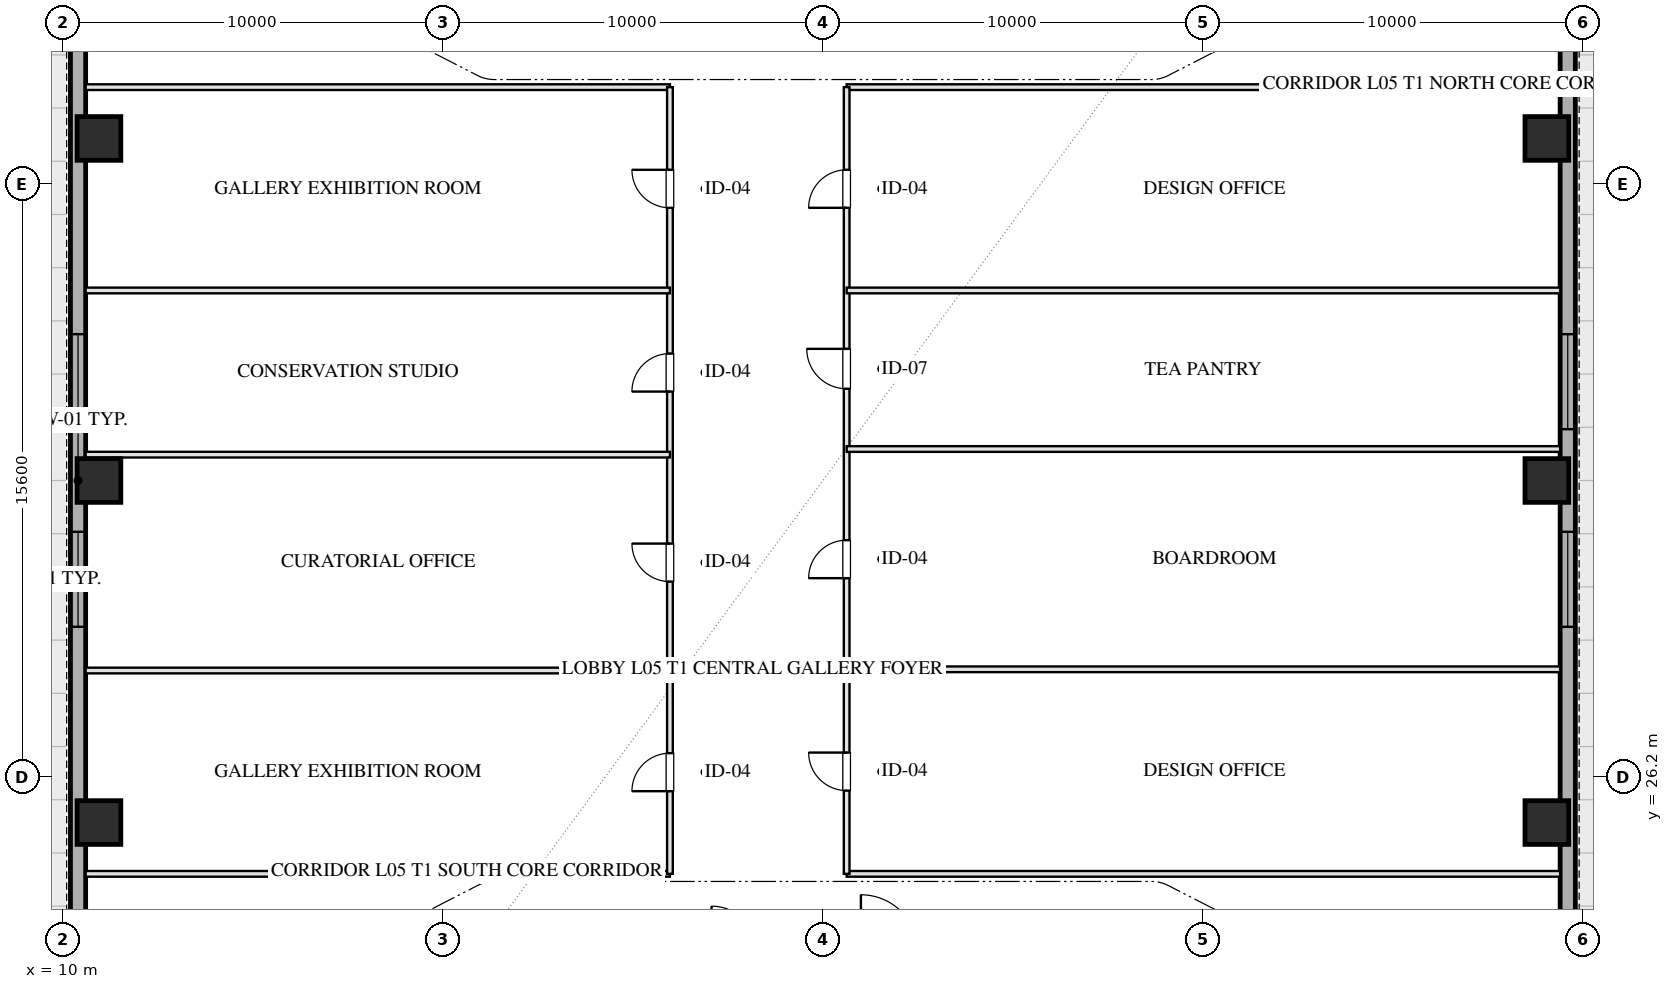
"""IFC4 building model, lengths in metres.
Left out: names, types, materials, properties, quantities, classifications, styles, units other than length and angle.
Written with IfcOpenShell. Run it as: python <this file> out.ifc"""

import sys

from ifc_helpers import new_model, si_unit, direction, frame, frame_2d, origin, origin_2d, place, context, subcontext, project, spatial, rectangle, hollow_rectangle, extrude, element, fill, save


model = new_model("IFC4")
c1 = context("Model", 3, precision=1e-05, world=origin(), true_north=direction((0.0, 1.0)))
c2 = subcontext(c1, "Body", "Model", "MODEL_VIEW")
j1 = project(units=[si_unit("LENGTHUNIT", "METRE"), si_unit("PLANEANGLEUNIT", "RADIAN")], contexts=[c1])
p1 = place(None, origin())
s1 = spatial("IfcSite", under=j1, at=p1, CompositionType="ELEMENT")
p2 = place(p1, origin())
s2 = spatial("IfcBuilding", under=s1, at=p2, CompositionType="ELEMENT")
p3 = place(p2, frame((0.0, 0.0, 26.0)))
s3 = spatial("IfcBuildingStorey", under=s2, at=p3, CompositionType="ELEMENT", Elevation=26.0)
for number, where, z_axis, x_axis in (
    (1, (10.95, 25.0, 0.0), (0.0, 0.0, 1.0), (1.0, 0.0, 0.0)),
    (2, (10.95, 34.0, 0.0), (0.0, 0.0, 1.0), (1.0, 0.0, 0.0)),
    (3, (10.95, 43.0, 0.0), (0.0, 0.0, 1.0), (1.0, 0.0, 0.0)),
    (4, (49.05, 25.0, 0.0), (0.0, 0.0, 1.0), (1.0, 0.0, 0.0)),
    (5, (49.05, 34.0, 0.0), (0.0, 0.0, 1.0), (1.0, 0.0, 0.0)),
    (6, (49.05, 43.0, 0.0), (0.0, 0.0, 1.0), (1.0, 0.0, 0.0)),
):
    element("IfcColumn", number, at=place(p3, frame(where, z_axis=z_axis, x_axis=x_axis)), inside=s3, PredefinedType="COLUMN", context=c2, shape_type="SweptSolid", body=[
        extrude(hollow_rectangle(XDim=1.15, YDim=1.15, WallThickness=0.04, at=origin_2d()), origin(), (0.0, 0.0, 1.0), 4.001),
    ])
p4 = place(p3, frame((10.4, 7.2, 0.0), z_axis=(0.0, 0.0, 1.0), x_axis=(0.0, 1.0, 0.0)))
e7 = element("IfcWall", 7, at=p4, inside=s3, PredefinedType="SOLIDWALL", context=c2, shape_type="SweptSolid", body=[
    extrude(rectangle(XDim=53.6, YDim=0.4, at=frame_2d((26.8, 0.0))), origin(), (0.0, 0.0, 1.0), 3.16),
])
p5 = place(p4, frame((22.95, 0.0, 0.75)))
e8 = element("IfcOpeningElement", 8, at=p5, cuts=e7, PredefinedType="OPENING", context=c2, shape_type="SweptSolid", body=[
    extrude(rectangle(XDim=2.5, YDim=1.75, at=frame_2d((1.25, 0.875))), frame((0.0, 0.21, 0.0), z_axis=(0.0, -1.0, 0.0), x_axis=(1.0, 0.0, 0.0)), (0.0, 0.0, 1.0), 0.42),
])
p6 = place(p4, frame((28.15, 0.0, 0.75)))
e9 = element("IfcOpeningElement", 9, at=p6, cuts=e7, PredefinedType="OPENING", context=c2, shape_type="SweptSolid", body=[
    extrude(rectangle(XDim=2.5, YDim=1.75, at=frame_2d((1.25, 0.875))), frame((0.0, 0.21, 0.0), z_axis=(0.0, -1.0, 0.0), x_axis=(1.0, 0.0, 0.0)), (0.0, 0.0, 1.0), 0.42),
])
p7 = place(p3, frame((49.6, 60.8, 0.0), z_axis=(0.0, 0.0, 1.0), x_axis=(0.0, -1.0, 0.0)))
e10 = element("IfcWall", 10, at=p7, inside=s3, PredefinedType="SOLIDWALL", context=c2, shape_type="SweptSolid", body=[
    extrude(rectangle(XDim=53.6, YDim=0.4, at=frame_2d((26.8, 0.0))), origin(), (0.0, 0.0, 1.0), 3.16),
])
p8 = place(p7, frame((28.15, 0.0, 0.75)))
e11 = element("IfcOpeningElement", 11, at=p8, cuts=e10, PredefinedType="OPENING", context=c2, shape_type="SweptSolid", body=[
    extrude(rectangle(XDim=2.5, YDim=1.75, at=frame_2d((1.25, 0.875))), frame((0.0, 0.21, 0.0), z_axis=(0.0, -1.0, 0.0), x_axis=(1.0, 0.0, 0.0)), (0.0, 0.0, 1.0), 0.42),
])
p9 = place(p7, frame((22.95, 0.0, 0.75)))
e12 = element("IfcOpeningElement", 12, at=p9, cuts=e10, PredefinedType="OPENING", context=c2, shape_type="SweptSolid", body=[
    extrude(rectangle(XDim=2.5, YDim=1.75, at=frame_2d((1.25, 0.875))), frame((0.0, 0.21, 0.0), z_axis=(0.0, -1.0, 0.0), x_axis=(1.0, 0.0, 0.0)), (0.0, 0.0, 1.0), 0.42),
])
p10 = place(p3, frame((10.6, 23.65, 0.0), z_axis=(0.0, 0.0, 1.0), x_axis=(1.0, 0.0, 0.0)))
e13 = element("IfcWall", 13, at=p10, inside=s3, PredefinedType="PARTITIONING", context=c2, shape_type="SweptSolid", body=[
    extrude(rectangle(XDim=15.375, YDim=0.15, at=frame_2d((7.688, 0.0))), origin(), (0.0, 0.0, 1.0), 3.725),
])
p11 = place(p3, frame((30.625, 23.65, 0.0), z_axis=(0.0, 0.0, 1.0), x_axis=(1.0, 0.0, 0.0)))
e14 = element("IfcWall", 14, at=p11, inside=s3, PredefinedType="PARTITIONING", context=c2, shape_type="SweptSolid", body=[
    extrude(rectangle(XDim=18.775, YDim=0.15, at=frame_2d((9.387, 0.0))), origin(), (0.0, 0.0, 1.0), 3.725),
])
p12 = place(p3, frame((10.6, 44.35, 0.0), z_axis=(0.0, 0.0, 1.0), x_axis=(1.0, 0.0, 0.0)))
e15 = element("IfcWall", 15, at=p12, inside=s3, PredefinedType="PARTITIONING", context=c2, shape_type="SweptSolid", body=[
    extrude(rectangle(XDim=15.375, YDim=0.15, at=frame_2d((7.688, 0.0))), origin(), (0.0, 0.0, 1.0), 3.725),
])
p13 = place(p3, frame((30.625, 44.35, 0.0), z_axis=(0.0, 0.0, 1.0), x_axis=(1.0, 0.0, 0.0)))
e16 = element("IfcWall", 16, at=p13, inside=s3, PredefinedType="PARTITIONING", context=c2, shape_type="SweptSolid", body=[
    extrude(rectangle(XDim=18.775, YDim=0.15, at=frame_2d((9.387, 0.0))), origin(), (0.0, 0.0, 1.0), 3.725),
])
p14 = place(p3, frame((25.975, 23.65, 0.0), z_axis=(0.0, 0.0, 1.0), x_axis=(0.0, 1.0, 0.0)))
e17 = element("IfcWall", 17, at=p14, inside=s3, PredefinedType="PARTITIONING", context=c2, shape_type="SweptSolid", body=[
    extrude(rectangle(XDim=20.7, YDim=0.15, at=frame_2d((10.35, 0.0))), origin(), (0.0, 0.0, 1.0), 3.725),
])
p15 = place(p14, frame((2.175, 0.0, 0.0)))
e18 = element("IfcOpeningElement", 18, at=p15, cuts=e17, PredefinedType="OPENING", context=c2, shape_type="SweptSolid", body=[
    extrude(rectangle(XDim=1.0, YDim=2.05, at=frame_2d((0.5, 1.025))), frame((0.0, 0.085, 0.0), z_axis=(0.0, -1.0, 0.0), x_axis=(1.0, 0.0, 0.0)), (0.0, 0.0, 1.0), 0.17),
])
p16 = place(p14, frame((7.69, 0.0, 0.0)))
e19 = element("IfcOpeningElement", 19, at=p16, cuts=e17, PredefinedType="OPENING", context=c2, shape_type="SweptSolid", body=[
    extrude(rectangle(XDim=1.0, YDim=2.05, at=frame_2d((0.5, 1.025))), frame((0.0, 0.085, 0.0), z_axis=(0.0, -1.0, 0.0), x_axis=(1.0, 0.0, 0.0)), (0.0, 0.0, 1.0), 0.17),
])
p17 = place(p14, frame((12.69, 0.0, 0.0)))
e20 = element("IfcOpeningElement", 20, at=p17, cuts=e17, PredefinedType="OPENING", context=c2, shape_type="SweptSolid", body=[
    extrude(rectangle(XDim=1.0, YDim=2.05, at=frame_2d((0.5, 1.025))), frame((0.0, 0.085, 0.0), z_axis=(0.0, -1.0, 0.0), x_axis=(1.0, 0.0, 0.0)), (0.0, 0.0, 1.0), 0.17),
])
p18 = place(p14, frame((17.525, 0.0, 0.0)))
e21 = element("IfcOpeningElement", 21, at=p18, cuts=e17, PredefinedType="OPENING", context=c2, shape_type="SweptSolid", body=[
    extrude(rectangle(XDim=1.0, YDim=2.05, at=frame_2d((0.5, 1.025))), frame((0.0, 0.085, 0.0), z_axis=(0.0, -1.0, 0.0), x_axis=(1.0, 0.0, 0.0)), (0.0, 0.0, 1.0), 0.17),
])
p19 = place(p3, frame((30.625, 23.65, 0.0), z_axis=(0.0, 0.0, 1.0), x_axis=(0.0, 1.0, 0.0)))
e22 = element("IfcWall", 22, at=p19, inside=s3, PredefinedType="PARTITIONING", context=c2, shape_type="SweptSolid", body=[
    extrude(rectangle(XDim=20.7, YDim=0.15, at=frame_2d((10.35, 0.0))), origin(), (0.0, 0.0, 1.0), 3.725),
])
p20 = place(p19, frame((2.191, 0.0, 0.0)))
e23 = element("IfcOpeningElement", 23, at=p20, cuts=e22, PredefinedType="OPENING", context=c2, shape_type="SweptSolid", body=[
    extrude(rectangle(XDim=1.0, YDim=2.05, at=frame_2d((0.5, 1.025))), frame((0.0, 0.085, 0.0), z_axis=(0.0, -1.0, 0.0), x_axis=(1.0, 0.0, 0.0)), (0.0, 0.0, 1.0), 0.17),
])
p21 = place(p19, frame((7.78, 0.0, 0.0)))
e24 = element("IfcOpeningElement", 24, at=p21, cuts=e22, PredefinedType="OPENING", context=c2, shape_type="SweptSolid", body=[
    extrude(rectangle(XDim=1.0, YDim=2.05, at=frame_2d((0.5, 1.025))), frame((0.0, 0.085, 0.0), z_axis=(0.0, -1.0, 0.0), x_axis=(1.0, 0.0, 0.0)), (0.0, 0.0, 1.0), 0.17),
])
p22 = place(p19, frame((12.764, 0.0, 0.0)))
e25 = element("IfcOpeningElement", 25, at=p22, cuts=e22, PredefinedType="OPENING", context=c2, shape_type="SweptSolid", body=[
    extrude(rectangle(XDim=1.05, YDim=2.05, at=frame_2d((0.525, 1.025))), frame((0.0, 0.085, 0.0), z_axis=(0.0, -1.0, 0.0), x_axis=(1.0, 0.0, 0.0)), (0.0, 0.0, 1.0), 0.17),
])
p23 = place(p19, frame((17.525, 0.0, 0.0)))
e26 = element("IfcOpeningElement", 26, at=p23, cuts=e22, PredefinedType="OPENING", context=c2, shape_type="SweptSolid", body=[
    extrude(rectangle(XDim=1.0, YDim=2.05, at=frame_2d((0.5, 1.025))), frame((0.0, 0.085, 0.0), z_axis=(0.0, -1.0, 0.0), x_axis=(1.0, 0.0, 0.0)), (0.0, 0.0, 1.0), 0.17),
])
for number, where, z_axis, x_axis in (
    (27, (10.6, 29.0, 0.0), (0.0, 0.0, 1.0), (1.0, 0.0, 0.0)),
    (28, (10.6, 34.68, 0.0), (0.0, 0.0, 1.0), (1.0, 0.0, 0.0)),
    (29, (10.6, 39.0, 0.0), (0.0, 0.0, 1.0), (1.0, 0.0, 0.0)),
):
    element("IfcWall", number, at=place(p3, frame(where, z_axis=z_axis, x_axis=x_axis)), inside=s3, PredefinedType="PARTITIONING", context=c2, shape_type="SweptSolid", body=[
        extrude(rectangle(XDim=15.375, YDim=0.15, at=frame_2d((7.688, 0.0))), origin(), (0.0, 0.0, 1.0), 3.725),
    ])
for number, where, z_axis, x_axis in (
    (30, (30.625, 29.032, 0.0), (0.0, 0.0, 1.0), (1.0, 0.0, 0.0)),
    (31, (30.625, 34.828, 0.0), (0.0, 0.0, 1.0), (1.0, 0.0, 0.0)),
    (32, (30.625, 39.0, 0.0), (0.0, 0.0, 1.0), (1.0, 0.0, 0.0)),
):
    element("IfcWall", number, at=place(p3, frame(where, z_axis=z_axis, x_axis=x_axis)), inside=s3, PredefinedType="PARTITIONING", context=c2, shape_type="SweptSolid", body=[
        extrude(rectangle(XDim=18.775, YDim=0.15, at=frame_2d((9.387, 0.0))), origin(), (0.0, 0.0, 1.0), 3.725),
    ])
p24 = place(p5, origin())
e33 = element("IfcWindow", 33, at=p24, inside=s3, PartitioningType="TRIPLE_PANEL_VERTICAL", PredefinedType="WINDOW", context=c2, shape_type="SweptSolid", body=[
    extrude(rectangle(XDim=2.5, YDim=1.75, at=frame_2d((1.25, 0.875))), frame((0.0, 0.03, 0.0), z_axis=(0.0, -1.0, 0.0), x_axis=(1.0, 0.0, 0.0)), (0.0, 0.0, 1.0), 0.06),
])
fill(e8, e33)
p25 = place(p6, origin())
e34 = element("IfcWindow", 34, at=p25, inside=s3, PartitioningType="TRIPLE_PANEL_VERTICAL", PredefinedType="WINDOW", context=c2, shape_type="SweptSolid", body=[
    extrude(rectangle(XDim=2.5, YDim=1.75, at=frame_2d((1.25, 0.875))), frame((0.0, 0.03, 0.0), z_axis=(0.0, -1.0, 0.0), x_axis=(1.0, 0.0, 0.0)), (0.0, 0.0, 1.0), 0.06),
])
fill(e9, e34)
p26 = place(p8, origin())
e35 = element("IfcWindow", 35, at=p26, inside=s3, PartitioningType="TRIPLE_PANEL_VERTICAL", PredefinedType="WINDOW", context=c2, shape_type="SweptSolid", body=[
    extrude(rectangle(XDim=2.5, YDim=1.75, at=frame_2d((1.25, 0.875))), frame((0.0, 0.03, 0.0), z_axis=(0.0, -1.0, 0.0), x_axis=(1.0, 0.0, 0.0)), (0.0, 0.0, 1.0), 0.06),
])
fill(e11, e35)
p27 = place(p9, origin())
e36 = element("IfcWindow", 36, at=p27, inside=s3, PartitioningType="TRIPLE_PANEL_VERTICAL", PredefinedType="WINDOW", context=c2, shape_type="SweptSolid", body=[
    extrude(rectangle(XDim=2.5, YDim=1.75, at=frame_2d((1.25, 0.875))), frame((0.0, 0.03, 0.0), z_axis=(0.0, -1.0, 0.0), x_axis=(1.0, 0.0, 0.0)), (0.0, 0.0, 1.0), 0.06),
])
fill(e12, e36)
p28 = place(p15, origin())
e37 = element("IfcDoor", 37, at=p28, inside=s3, OperationType="SINGLE_SWING_LEFT", PredefinedType="DOOR", context=c2, shape_type="SweptSolid", body=[
    extrude(rectangle(XDim=1.0, YDim=2.05, at=frame_2d((0.5, 1.025))), frame((0.0, 0.025, 0.0), z_axis=(0.0, -1.0, 0.0), x_axis=(1.0, 0.0, 0.0)), (0.0, 0.0, 1.0), 0.05),
])
fill(e18, e37)
p29 = place(p16, origin())
e38 = element("IfcDoor", 38, at=p29, inside=s3, OperationType="SINGLE_SWING_RIGHT", PredefinedType="DOOR", context=c2, shape_type="SweptSolid", body=[
    extrude(rectangle(XDim=1.0, YDim=2.05, at=frame_2d((0.5, 1.025))), frame((0.0, 0.025, 0.0), z_axis=(0.0, -1.0, 0.0), x_axis=(1.0, 0.0, 0.0)), (0.0, 0.0, 1.0), 0.05),
])
fill(e19, e38)
p30 = place(p17, origin())
e39 = element("IfcDoor", 39, at=p30, inside=s3, OperationType="SINGLE_SWING_LEFT", PredefinedType="DOOR", context=c2, shape_type="SweptSolid", body=[
    extrude(rectangle(XDim=1.0, YDim=2.05, at=frame_2d((0.5, 1.025))), frame((0.0, 0.025, 0.0), z_axis=(0.0, -1.0, 0.0), x_axis=(1.0, 0.0, 0.0)), (0.0, 0.0, 1.0), 0.05),
])
fill(e20, e39)
p31 = place(p18, origin())
e40 = element("IfcDoor", 40, at=p31, inside=s3, OperationType="SINGLE_SWING_RIGHT", PredefinedType="DOOR", context=c2, shape_type="SweptSolid", body=[
    extrude(rectangle(XDim=1.0, YDim=2.05, at=frame_2d((0.5, 1.025))), frame((0.0, 0.025, 0.0), z_axis=(0.0, -1.0, 0.0), x_axis=(1.0, 0.0, 0.0)), (0.0, 0.0, 1.0), 0.05),
])
fill(e21, e40)
p32 = place(p20, origin())
e41 = element("IfcDoor", 41, at=p32, inside=s3, OperationType="SINGLE_SWING_RIGHT", PredefinedType="DOOR", context=c2, shape_type="SweptSolid", body=[
    extrude(rectangle(XDim=1.0, YDim=2.05, at=frame_2d((0.5, 1.025))), frame((0.0, 0.025, 0.0), z_axis=(0.0, -1.0, 0.0), x_axis=(1.0, 0.0, 0.0)), (0.0, 0.0, 1.0), 0.05),
])
fill(e23, e41)
p33 = place(p21, origin())
e42 = element("IfcDoor", 42, at=p33, inside=s3, OperationType="SINGLE_SWING_LEFT", PredefinedType="DOOR", context=c2, shape_type="SweptSolid", body=[
    extrude(rectangle(XDim=1.0, YDim=2.05, at=frame_2d((0.5, 1.025))), frame((0.0, 0.025, 0.0), z_axis=(0.0, -1.0, 0.0), x_axis=(1.0, 0.0, 0.0)), (0.0, 0.0, 1.0), 0.05),
])
fill(e24, e42)
p34 = place(p22, origin())
e43 = element("IfcDoor", 43, at=p34, inside=s3, OperationType="SINGLE_SWING_RIGHT", PredefinedType="DOOR", context=c2, shape_type="SweptSolid", body=[
    extrude(rectangle(XDim=1.05, YDim=2.05, at=frame_2d((0.525, 1.025))), frame((0.0, 0.025, 0.0), z_axis=(0.0, -1.0, 0.0), x_axis=(1.0, 0.0, 0.0)), (0.0, 0.0, 1.0), 0.05),
])
fill(e25, e43)
p35 = place(p23, origin())
e44 = element("IfcDoor", 44, at=p35, inside=s3, OperationType="SINGLE_SWING_LEFT", PredefinedType="DOOR", context=c2, shape_type="SweptSolid", body=[
    extrude(rectangle(XDim=1.0, YDim=2.05, at=frame_2d((0.5, 1.025))), frame((0.0, 0.025, 0.0), z_axis=(0.0, -1.0, 0.0), x_axis=(1.0, 0.0, 0.0)), (0.0, 0.0, 1.0), 0.05),
])
fill(e26, e44)
save(model, sys.argv[1])
